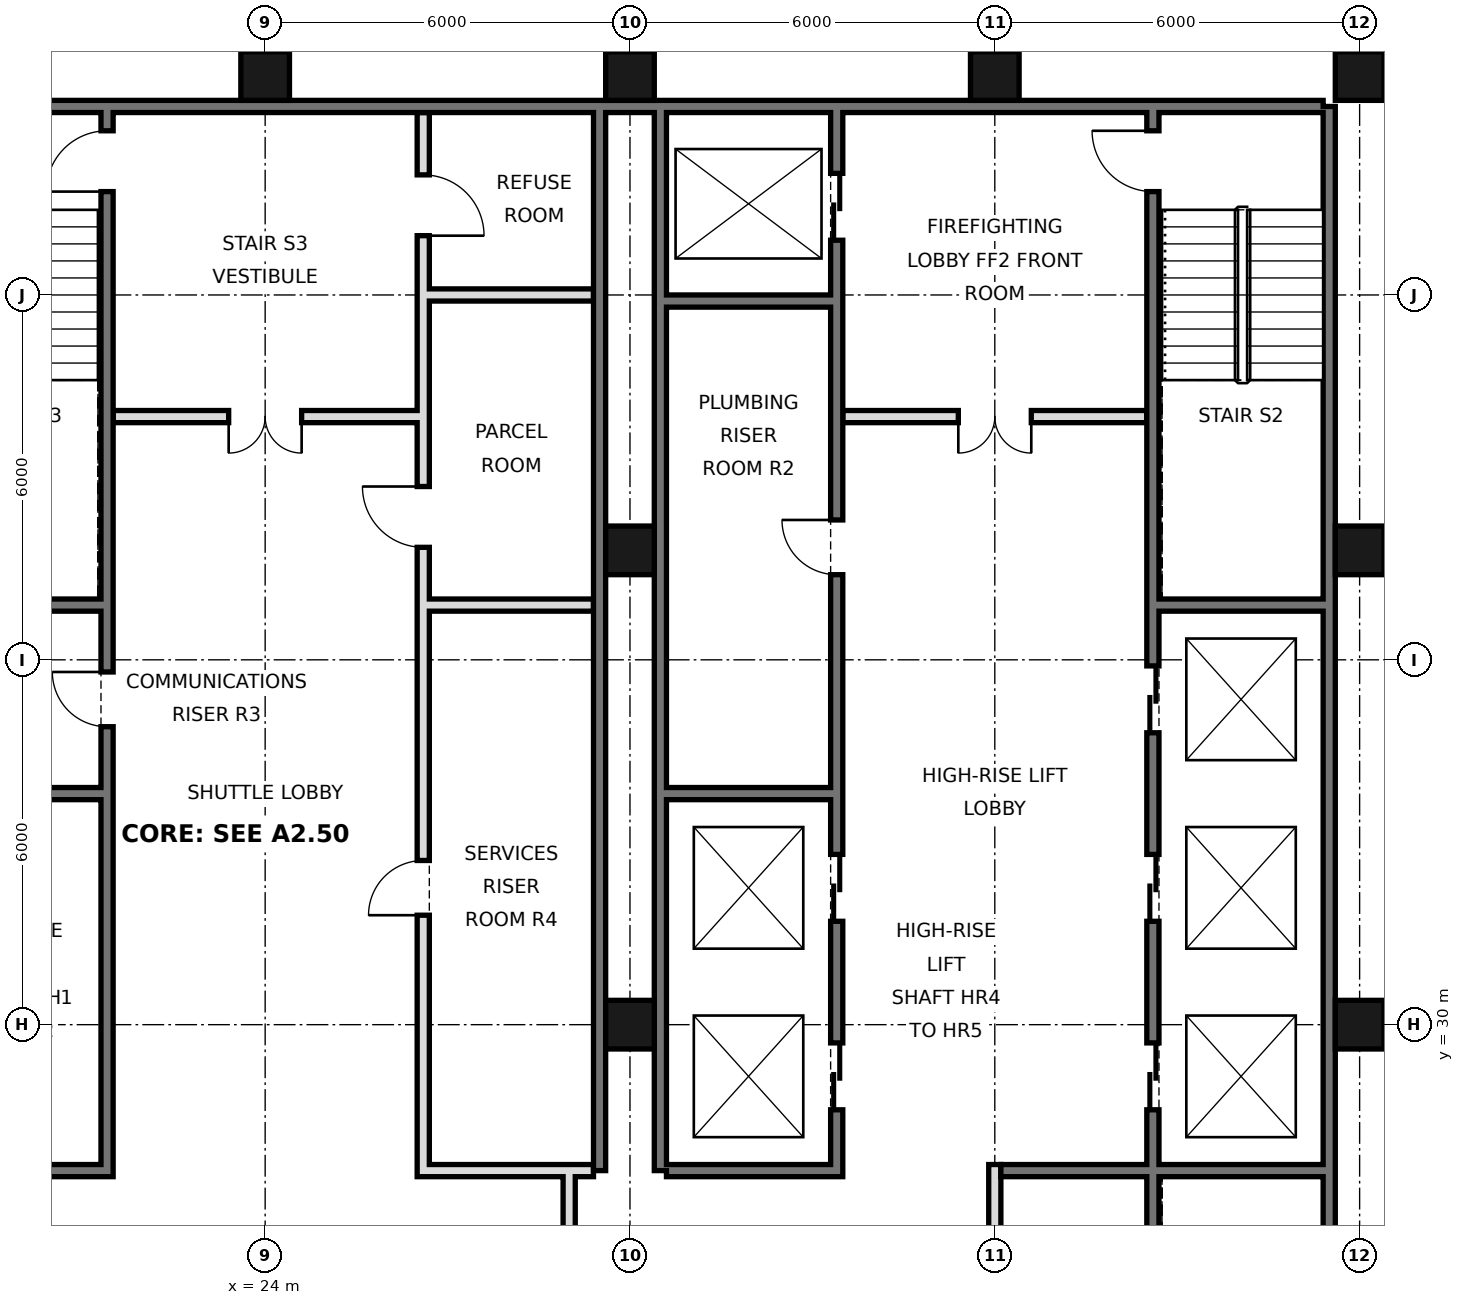
"""IFC4 building model, lengths in metres.
Left out: names, types, materials, properties, quantities, classifications, styles, units other than length and angle.
Written with IfcOpenShell. Run it as: python <this file> out.ifc"""

import sys

from ifc_helpers import new_model, si_unit, direction, frame, frame_2d, origin, origin_2d, place, context, subcontext, project, spatial, rectangle, hollow_rectangle, extrude, element, fill, save


model = new_model("IFC4")
c1 = context("Model", 3, precision=1e-05, world=origin(), true_north=direction((0.0, 1.0)))
c2 = subcontext(c1, "Body", "Model", "MODEL_VIEW")
j1 = project(units=[si_unit("LENGTHUNIT", "METRE"), si_unit("PLANEANGLEUNIT", "RADIAN")], contexts=[c1])
p1 = place(None, origin())
s1 = spatial("IfcSite", under=j1, at=p1, CompositionType="ELEMENT")
p2 = place(p1, origin())
s2 = spatial("IfcBuilding", under=s1, at=p2, CompositionType="ELEMENT")
p3 = place(p2, frame((0.0, 0.0, 199.2)))
s3 = spatial("IfcBuildingStorey", under=s2, at=p3, CompositionType="ELEMENT", Elevation=199.2)
for number, where, z_axis, x_axis in (
    (1, (24.0, 45.6, 0.0), (0.0, 0.0, 1.0), (1.0, 0.0, 0.0)),
    (2, (30.0, 30.0, 0.0), (0.0, 0.0, 1.0), (1.0, 0.0, 0.0)),
    (3, (30.0, 37.8, 0.0), (0.0, 0.0, 1.0), (1.0, 0.0, 0.0)),
    (4, (30.0, 45.6, 0.0), (0.0, 0.0, 1.0), (1.0, 0.0, 0.0)),
    (5, (36.0, 45.6, 0.0), (0.0, 0.0, 1.0), (1.0, 0.0, 0.0)),
    (6, (42.0, 30.0, 0.0), (0.0, 0.0, 1.0), (1.0, 0.0, 0.0)),
    (7, (42.0, 37.8, 0.0), (0.0, 0.0, 1.0), (1.0, 0.0, 0.0)),
    (8, (42.0, 45.6, 0.0), (0.0, 0.0, 1.0), (1.0, 0.0, 0.0)),
):
    element("IfcColumn", number, at=place(p3, frame(where, z_axis=z_axis, x_axis=x_axis)), inside=s3, PredefinedType="COLUMN", context=c2, shape_type="SweptSolid", body=[
        extrude(hollow_rectangle(XDim=0.8, YDim=0.8, WallThickness=0.04, at=origin_2d()), origin(), (0.0, 0.0, 1.0), 3.6),
    ])
p4 = place(p3, frame((41.5, 21.6, 0.0), z_axis=(0.0, 0.0, 1.0), x_axis=(0.0, 1.0, 0.0)))
e9 = element("IfcWall", 9, at=p4, inside=s3, PredefinedType="SOLIDWALL", context=c2, shape_type="SweptSolid", body=[
    extrude(rectangle(XDim=23.5, YDim=0.2, at=frame_2d((11.75, 0.0))), origin(), (0.0, 0.0, 1.0), 3.42),
])
p5 = place(p3, frame((6.6, 45.1, 0.0), z_axis=(0.0, 0.0, 1.0), x_axis=(1.0, 0.0, 0.0)))
e10 = element("IfcWall", 10, at=p5, inside=s3, PredefinedType="SOLIDWALL", context=c2, shape_type="SweptSolid", body=[
    extrude(rectangle(XDim=34.8, YDim=0.2, at=frame_2d((17.4, 0.0))), origin(), (0.0, 0.0, 1.0), 3.42),
])
for number, where, z_axis, x_axis in (
    (11, (29.5, 27.6, 0.0), (0.0, 0.0, 1.0), (0.0, 1.0, 0.0)),
    (12, (30.5, 27.6, 0.0), (0.0, 0.0, 1.0), (0.0, 1.0, 0.0)),
):
    element("IfcWall", number, at=place(p3, frame(where, z_axis=z_axis, x_axis=x_axis)), inside=s3, PredefinedType="SOLIDWALL", context=c2, shape_type="SweptSolid", body=[
        extrude(rectangle(XDim=17.5, YDim=0.2, at=frame_2d((8.75, 0.0))), origin(), (0.0, 0.0, 1.0), 3.42),
    ])
p6 = place(p3, frame((29.0, 21.6, 0.0), z_axis=(0.0, 0.0, 1.0), x_axis=(0.0, 1.0, 0.0)))
e13 = element("IfcWall", 13, at=p6, inside=s3, PredefinedType="PARTITIONING", context=c2, shape_type="SweptSolid", body=[
    extrude(rectangle(XDim=6.0, YDim=0.2, at=frame_2d((3.0, 0.0))), origin(), (0.0, 0.0, 1.0), 3.42),
])
p7 = place(p6, frame((2.1, 0.0, 0.0)))
e14 = element("IfcOpeningElement", 14, at=p7, cuts=e13, PredefinedType="OPENING", context=c2, shape_type="SweptSolid", body=[
    extrude(rectangle(XDim=1.8, YDim=2.1, at=frame_2d((0.9, 1.05))), frame((0.0, 0.11, 0.0), z_axis=(0.0, -1.0, 0.0), x_axis=(1.0, 0.0, 0.0)), (0.0, 0.0, 1.0), 0.22),
])
p8 = place(p3, frame((21.4, 27.5, 0.0), z_axis=(0.0, 0.0, 1.0), x_axis=(0.0, 1.0, 0.0)))
e15 = element("IfcWall", 15, at=p8, inside=s3, PredefinedType="SOLIDWALL", context=c2, shape_type="SweptSolid", body=[
    extrude(rectangle(XDim=17.5, YDim=0.2, at=frame_2d((8.75, 0.0))), origin(), (0.0, 0.0, 1.0), 3.42),
])
p9 = place(p8, frame((16.2, 0.0, 0.0)))
e16 = element("IfcOpeningElement", 16, at=p9, cuts=e15, PredefinedType="OPENING", context=c2, shape_type="SweptSolid", body=[
    extrude(rectangle(XDim=1.0, YDim=2.1, at=frame_2d((0.5, 1.05))), frame((0.0, 0.11, 0.0), z_axis=(0.0, -1.0, 0.0), x_axis=(1.0, 0.0, 0.0)), (0.0, 0.0, 1.0), 0.22),
])
p10 = place(p8, frame((7.4, 0.0, 0.0)))
e17 = element("IfcOpeningElement", 17, at=p10, cuts=e15, PredefinedType="OPENING", context=c2, shape_type="SweptSolid", body=[
    extrude(rectangle(XDim=0.9, YDim=2.1, at=frame_2d((0.45, 1.05))), frame((0.0, 0.11, 0.0), z_axis=(0.0, -1.0, 0.0), x_axis=(1.0, 0.0, 0.0)), (0.0, 0.0, 1.0), 0.22),
])
p11 = place(p3, frame((26.6, 27.5, 0.0), z_axis=(0.0, 0.0, 1.0), x_axis=(0.0, 1.0, 0.0)))
e18 = element("IfcWall", 18, at=p11, inside=s3, PredefinedType="SOLIDWALL", context=c2, shape_type="SweptSolid", body=[
    extrude(rectangle(XDim=17.5, YDim=0.2, at=frame_2d((8.75, 0.0))), origin(), (0.0, 0.0, 1.0), 3.42),
])
p12 = place(p11, frame((4.3, 0.0, 0.0)))
e19 = element("IfcOpeningElement", 19, at=p12, cuts=e18, PredefinedType="OPENING", context=c2, shape_type="SweptSolid", body=[
    extrude(rectangle(XDim=0.9, YDim=2.1, at=frame_2d((0.45, 1.05))), frame((0.0, 0.11, 0.0), z_axis=(0.0, -1.0, 0.0), x_axis=(1.0, 0.0, 0.0)), (0.0, 0.0, 1.0), 0.22),
])
p13 = place(p11, frame((10.35, 0.0, 0.0)))
e20 = element("IfcOpeningElement", 20, at=p13, cuts=e18, PredefinedType="OPENING", context=c2, shape_type="SweptSolid", body=[
    extrude(rectangle(XDim=1.0, YDim=2.1, at=frame_2d((0.5, 1.05))), frame((0.0, 0.11, 0.0), z_axis=(0.0, -1.0, 0.0), x_axis=(1.0, 0.0, 0.0)), (0.0, 0.0, 1.0), 0.22),
])
p14 = place(p11, frame((15.475, 0.0, 0.0)))
e21 = element("IfcOpeningElement", 21, at=p14, cuts=e18, PredefinedType="OPENING", context=c2, shape_type="SweptSolid", body=[
    extrude(rectangle(XDim=1.0, YDim=2.1, at=frame_2d((0.5, 1.05))), frame((0.0, 0.11, 0.0), z_axis=(0.0, -1.0, 0.0), x_axis=(1.0, 0.0, 0.0)), (0.0, 0.0, 1.0), 0.22),
])
p15 = place(p3, frame((33.4, 27.5, 0.0), z_axis=(0.0, 0.0, 1.0), x_axis=(0.0, 1.0, 0.0)))
e22 = element("IfcWall", 22, at=p15, inside=s3, PredefinedType="SOLIDWALL", context=c2, shape_type="SweptSolid", body=[
    extrude(rectangle(XDim=17.5, YDim=0.2, at=frame_2d((8.75, 0.0))), origin(), (0.0, 0.0, 1.0), 3.42),
])
p16 = place(p15, frame((1.1, 0.0, 0.0)))
e23 = element("IfcOpeningElement", 23, at=p16, cuts=e22, PredefinedType="OPENING", context=c2, shape_type="SweptSolid", body=[
    extrude(rectangle(XDim=1.1, YDim=2.1, at=frame_2d((0.55, 1.05))), frame((0.0, 0.11, 0.0), z_axis=(0.0, -1.0, 0.0), x_axis=(1.0, 0.0, 0.0)), (0.0, 0.0, 1.0), 0.22),
])
p17 = place(p15, frame((4.2, 0.0, 0.0)))
e24 = element("IfcOpeningElement", 24, at=p17, cuts=e22, PredefinedType="OPENING", context=c2, shape_type="SweptSolid", body=[
    extrude(rectangle(XDim=1.1, YDim=2.1, at=frame_2d((0.55, 1.05))), frame((0.0, 0.11, 0.0), z_axis=(0.0, -1.0, 0.0), x_axis=(1.0, 0.0, 0.0)), (0.0, 0.0, 1.0), 0.22),
])
p18 = place(p15, frame((15.4, 0.0, 0.0)))
e25 = element("IfcOpeningElement", 25, at=p18, cuts=e22, PredefinedType="OPENING", context=c2, shape_type="SweptSolid", body=[
    extrude(rectangle(XDim=1.1, YDim=2.1, at=frame_2d((0.55, 1.05))), frame((0.0, 0.11, 0.0), z_axis=(0.0, -1.0, 0.0), x_axis=(1.0, 0.0, 0.0)), (0.0, 0.0, 1.0), 0.22),
])
p19 = place(p15, frame((9.9, 0.0, 0.0)))
e26 = element("IfcOpeningElement", 26, at=p19, cuts=e22, PredefinedType="OPENING", context=c2, shape_type="SweptSolid", body=[
    extrude(rectangle(XDim=0.9, YDim=2.1, at=frame_2d((0.45, 1.05))), frame((0.0, 0.11, 0.0), z_axis=(0.0, -1.0, 0.0), x_axis=(1.0, 0.0, 0.0)), (0.0, 0.0, 1.0), 0.22),
])
p20 = place(p3, frame((36.0, 21.6, 0.0), z_axis=(0.0, 0.0, 1.0), x_axis=(0.0, 1.0, 0.0)))
e27 = element("IfcWall", 27, at=p20, inside=s3, PredefinedType="PARTITIONING", context=c2, shape_type="SweptSolid", body=[
    extrude(rectangle(XDim=6.1, YDim=0.2, at=frame_2d((3.05, 0.0))), origin(), (0.0, 0.0, 1.0), 3.42),
])
p21 = place(p3, frame((38.6, 21.6, 0.0), z_axis=(0.0, 0.0, 1.0), x_axis=(0.0, 1.0, 0.0)))
e28 = element("IfcWall", 28, at=p21, inside=s3, PredefinedType="SOLIDWALL", context=c2, shape_type="SweptSolid", body=[
    extrude(rectangle(XDim=23.4, YDim=0.2, at=frame_2d((11.7, 0.0))), origin(), (0.0, 0.0, 1.0), 3.42),
])
p22 = place(p21, frame((7.0, 0.0, 0.0)))
e29 = element("IfcOpeningElement", 29, at=p22, cuts=e28, PredefinedType="OPENING", context=c2, shape_type="SweptSolid", body=[
    extrude(rectangle(XDim=1.1, YDim=2.1, at=frame_2d((0.55, 1.05))), frame((0.0, 0.11, 0.0), z_axis=(0.0, -1.0, 0.0), x_axis=(1.0, 0.0, 0.0)), (0.0, 0.0, 1.0), 0.22),
])
p23 = place(p21, frame((10.1, 0.0, 0.0)))
e30 = element("IfcOpeningElement", 30, at=p23, cuts=e28, PredefinedType="OPENING", context=c2, shape_type="SweptSolid", body=[
    extrude(rectangle(XDim=1.1, YDim=2.1, at=frame_2d((0.55, 1.05))), frame((0.0, 0.11, 0.0), z_axis=(0.0, -1.0, 0.0), x_axis=(1.0, 0.0, 0.0)), (0.0, 0.0, 1.0), 0.22),
])
p24 = place(p21, frame((13.2, 0.0, 0.0)))
e31 = element("IfcOpeningElement", 31, at=p24, cuts=e28, PredefinedType="OPENING", context=c2, shape_type="SweptSolid", body=[
    extrude(rectangle(XDim=1.1, YDim=2.1, at=frame_2d((0.55, 1.05))), frame((0.0, 0.11, 0.0), z_axis=(0.0, -1.0, 0.0), x_axis=(1.0, 0.0, 0.0)), (0.0, 0.0, 1.0), 0.22),
])
p25 = place(p21, frame((22.1, 0.0, 0.0)))
e32 = element("IfcOpeningElement", 32, at=p25, cuts=e28, PredefinedType="OPENING", context=c2, shape_type="SweptSolid", body=[
    extrude(rectangle(XDim=1.0, YDim=2.1, at=frame_2d((0.5, 1.05))), frame((0.0, 0.11, 0.0), z_axis=(0.0, -1.0, 0.0), x_axis=(1.0, 0.0, 0.0)), (0.0, 0.0, 1.0), 0.22),
])
p26 = place(p21, frame((0.175, 0.0, 0.0)))
e33 = element("IfcOpeningElement", 33, at=p26, cuts=e28, PredefinedType="OPENING", context=c2, shape_type="SweptSolid", body=[
    extrude(rectangle(XDim=0.9, YDim=2.1, at=frame_2d((0.45, 1.05))), frame((0.0, 0.11, 0.0), z_axis=(0.0, -1.0, 0.0), x_axis=(1.0, 0.0, 0.0)), (0.0, 0.0, 1.0), 0.22),
])
for number, where, z_axis, x_axis in (
    (34, (18.6, 27.6, 0.0), (0.0, 0.0, 1.0), (1.0, 0.0, 0.0)),
    (35, (26.7, 27.6, 0.0), (0.0, 0.0, 1.0), (1.0, 0.0, 0.0)),
    (36, (30.6, 27.6, 0.0), (0.0, 0.0, 1.0), (1.0, 0.0, 0.0)),
):
    element("IfcWall", number, at=place(p3, frame(where, z_axis=z_axis, x_axis=x_axis)), inside=s3, PredefinedType="SOLIDWALL", context=c2, shape_type="SweptSolid", body=[
        extrude(rectangle(XDim=2.7, YDim=0.2, at=frame_2d((1.35, 0.0))), origin(), (0.0, 0.0, 1.0), 3.42),
    ])
p27 = place(p3, frame((36.1, 27.6, 0.0), z_axis=(0.0, 0.0, 1.0), x_axis=(1.0, 0.0, 0.0)))
e37 = element("IfcWall", 37, at=p27, inside=s3, PredefinedType="SOLIDWALL", context=c2, shape_type="SweptSolid", body=[
    extrude(rectangle(XDim=5.3, YDim=0.2, at=frame_2d((2.65, 0.0))), origin(), (0.0, 0.0, 1.0), 3.42),
])
for number, where, z_axis, x_axis in (
    (38, (18.6, 33.8, 0.0), (0.0, 0.0, 1.0), (1.0, 0.0, 0.0)),
    (39, (30.6, 33.8, 0.0), (0.0, 0.0, 1.0), (1.0, 0.0, 0.0)),
    (40, (18.6, 36.9, 0.0), (0.0, 0.0, 1.0), (1.0, 0.0, 0.0)),
    (41, (26.7, 36.9, 0.0), (0.0, 0.0, 1.0), (1.0, 0.0, 0.0)),
    (42, (38.7, 36.9, 0.0), (0.0, 0.0, 1.0), (1.0, 0.0, 0.0)),
):
    element("IfcWall", number, at=place(p3, frame(where, z_axis=z_axis, x_axis=x_axis)), inside=s3, PredefinedType="SOLIDWALL", context=c2, shape_type="SweptSolid", body=[
        extrude(rectangle(XDim=2.7, YDim=0.2, at=frame_2d((1.35, 0.0))), origin(), (0.0, 0.0, 1.0), 3.42),
    ])
p28 = place(p3, frame((21.5, 40.0, 0.0), z_axis=(0.0, 0.0, 1.0), x_axis=(1.0, 0.0, 0.0)))
e43 = element("IfcWall", 43, at=p28, inside=s3, PredefinedType="PARTITIONING", context=c2, shape_type="SweptSolid", body=[
    extrude(rectangle(XDim=5.0, YDim=0.2, at=frame_2d((2.5, 0.0))), origin(), (0.0, 0.0, 1.0), 3.42),
])
p29 = place(p28, frame((1.9, 0.0, 0.0)))
e44 = element("IfcOpeningElement", 44, at=p29, cuts=e43, PredefinedType="OPENING", context=c2, shape_type="SweptSolid", body=[
    extrude(rectangle(XDim=1.2, YDim=2.1, at=frame_2d((0.6, 1.05))), frame((0.0, 0.11, 0.0), z_axis=(0.0, -1.0, 0.0), x_axis=(1.0, 0.0, 0.0)), (0.0, 0.0, 1.0), 0.22),
])
p30 = place(p3, frame((33.5, 40.0, 0.0), z_axis=(0.0, 0.0, 1.0), x_axis=(1.0, 0.0, 0.0)))
e45 = element("IfcWall", 45, at=p30, inside=s3, PredefinedType="PARTITIONING", context=c2, shape_type="SweptSolid", body=[
    extrude(rectangle(XDim=5.0, YDim=0.2, at=frame_2d((2.5, 0.0))), origin(), (0.0, 0.0, 1.0), 3.42),
])
p31 = place(p30, frame((1.9, 0.0, 0.0)))
e46 = element("IfcOpeningElement", 46, at=p31, cuts=e45, PredefinedType="OPENING", context=c2, shape_type="SweptSolid", body=[
    extrude(rectangle(XDim=1.2, YDim=2.1, at=frame_2d((0.6, 1.05))), frame((0.0, 0.11, 0.0), z_axis=(0.0, -1.0, 0.0), x_axis=(1.0, 0.0, 0.0)), (0.0, 0.0, 1.0), 0.22),
])
p32 = place(p3, frame((30.6, 41.9, 0.0), z_axis=(0.0, 0.0, 1.0), x_axis=(1.0, 0.0, 0.0)))
e47 = element("IfcWall", 47, at=p32, inside=s3, PredefinedType="SOLIDWALL", context=c2, shape_type="SweptSolid", body=[
    extrude(rectangle(XDim=2.7, YDim=0.2, at=frame_2d((1.35, 0.0))), origin(), (0.0, 0.0, 1.0), 3.42),
])
p33 = place(p3, frame((26.7, 42.0, 0.0), z_axis=(0.0, 0.0, 1.0), x_axis=(1.0, 0.0, 0.0)))
e48 = element("IfcWall", 48, at=p33, inside=s3, PredefinedType="PARTITIONING", context=c2, shape_type="SweptSolid", body=[
    extrude(rectangle(XDim=2.7, YDim=0.2, at=frame_2d((1.35, 0.0))), origin(), (0.0, 0.0, 1.0), 3.42),
])
p34 = place(p29, frame((1.2, 0.0, 0.0), z_axis=(0.0, 0.0, 1.0), x_axis=(-1.0, 0.0, 0.0)))
e49 = element("IfcDoor", 49, at=p34, inside=s3, OperationType="DOUBLE_DOOR_SINGLE_SWING", PredefinedType="DOOR", context=c2, shape_type="SweptSolid", body=[
    extrude(rectangle(XDim=1.2, YDim=2.1, at=frame_2d((0.6, 1.05))), frame((0.0, 0.025, 0.0), z_axis=(0.0, -1.0, 0.0), x_axis=(1.0, 0.0, 0.0)), (0.0, 0.0, 1.0), 0.05),
])
fill(e44, e49)
p35 = place(p31, frame((1.2, 0.0, 0.0), z_axis=(0.0, 0.0, 1.0), x_axis=(-1.0, 0.0, 0.0)))
e50 = element("IfcDoor", 50, at=p35, inside=s3, OperationType="DOUBLE_DOOR_SINGLE_SWING", PredefinedType="DOOR", context=c2, shape_type="SweptSolid", body=[
    extrude(rectangle(XDim=1.2, YDim=2.1, at=frame_2d((0.6, 1.05))), frame((0.0, 0.025, 0.0), z_axis=(0.0, -1.0, 0.0), x_axis=(1.0, 0.0, 0.0)), (0.0, 0.0, 1.0), 0.05),
])
fill(e46, e50)
p36 = place(p22, origin())
e51 = element("IfcDoor", 51, at=p36, inside=s3, OperationType="DOUBLE_DOOR_SLIDING", PredefinedType="DOOR", context=c2, shape_type="SweptSolid", body=[
    extrude(rectangle(XDim=1.1, YDim=2.1, at=frame_2d((0.55, 1.05))), frame((0.0, 0.025, 0.0), z_axis=(0.0, -1.0, 0.0), x_axis=(1.0, 0.0, 0.0)), (0.0, 0.0, 1.0), 0.05),
])
fill(e29, e51)
p37 = place(p23, origin())
e52 = element("IfcDoor", 52, at=p37, inside=s3, OperationType="DOUBLE_DOOR_SLIDING", PredefinedType="DOOR", context=c2, shape_type="SweptSolid", body=[
    extrude(rectangle(XDim=1.1, YDim=2.1, at=frame_2d((0.55, 1.05))), frame((0.0, 0.025, 0.0), z_axis=(0.0, -1.0, 0.0), x_axis=(1.0, 0.0, 0.0)), (0.0, 0.0, 1.0), 0.05),
])
fill(e30, e52)
p38 = place(p24, origin())
e53 = element("IfcDoor", 53, at=p38, inside=s3, OperationType="DOUBLE_DOOR_SLIDING", PredefinedType="DOOR", context=c2, shape_type="SweptSolid", body=[
    extrude(rectangle(XDim=1.1, YDim=2.1, at=frame_2d((0.55, 1.05))), frame((0.0, 0.025, 0.0), z_axis=(0.0, -1.0, 0.0), x_axis=(1.0, 0.0, 0.0)), (0.0, 0.0, 1.0), 0.05),
])
fill(e31, e53)
p39 = place(p16, origin())
e54 = element("IfcDoor", 54, at=p39, inside=s3, OperationType="DOUBLE_DOOR_SLIDING", PredefinedType="DOOR", context=c2, shape_type="SweptSolid", body=[
    extrude(rectangle(XDim=1.1, YDim=2.1, at=frame_2d((0.55, 1.05))), frame((0.0, 0.025, 0.0), z_axis=(0.0, -1.0, 0.0), x_axis=(1.0, 0.0, 0.0)), (0.0, 0.0, 1.0), 0.05),
])
fill(e23, e54)
p40 = place(p17, origin())
e55 = element("IfcDoor", 55, at=p40, inside=s3, OperationType="DOUBLE_DOOR_SLIDING", PredefinedType="DOOR", context=c2, shape_type="SweptSolid", body=[
    extrude(rectangle(XDim=1.1, YDim=2.1, at=frame_2d((0.55, 1.05))), frame((0.0, 0.025, 0.0), z_axis=(0.0, -1.0, 0.0), x_axis=(1.0, 0.0, 0.0)), (0.0, 0.0, 1.0), 0.05),
])
fill(e24, e55)
p41 = place(p18, origin())
e56 = element("IfcDoor", 56, at=p41, inside=s3, OperationType="DOUBLE_DOOR_SLIDING", PredefinedType="DOOR", context=c2, shape_type="SweptSolid", body=[
    extrude(rectangle(XDim=1.1, YDim=2.1, at=frame_2d((0.55, 1.05))), frame((0.0, 0.025, 0.0), z_axis=(0.0, -1.0, 0.0), x_axis=(1.0, 0.0, 0.0)), (0.0, 0.0, 1.0), 0.05),
])
fill(e25, e56)
p42 = place(p25, frame((1.0, 0.0, 0.0), z_axis=(0.0, 0.0, 1.0), x_axis=(-1.0, 0.0, 0.0)))
e57 = element("IfcDoor", 57, at=p42, inside=s3, OperationType="SINGLE_SWING_LEFT", PredefinedType="DOOR", context=c2, shape_type="SweptSolid", body=[
    extrude(rectangle(XDim=1.0, YDim=2.1, at=frame_2d((0.5, 1.05))), frame((0.0, 0.025, 0.0), z_axis=(0.0, -1.0, 0.0), x_axis=(1.0, 0.0, 0.0)), (0.0, 0.0, 1.0), 0.05),
])
fill(e32, e57)
p43 = place(p9, origin())
e58 = element("IfcDoor", 58, at=p43, inside=s3, OperationType="SINGLE_SWING_LEFT", PredefinedType="DOOR", context=c2, shape_type="SweptSolid", body=[
    extrude(rectangle(XDim=1.0, YDim=2.1, at=frame_2d((0.5, 1.05))), frame((0.0, 0.025, 0.0), z_axis=(0.0, -1.0, 0.0), x_axis=(1.0, 0.0, 0.0)), (0.0, 0.0, 1.0), 0.05),
])
fill(e16, e58)
p44 = place(p19, frame((0.9, 0.0, 0.0), z_axis=(0.0, 0.0, 1.0), x_axis=(-1.0, 0.0, 0.0)))
e59 = element("IfcDoor", 59, at=p44, inside=s3, OperationType="SINGLE_SWING_LEFT", PredefinedType="DOOR", context=c2, shape_type="SweptSolid", body=[
    extrude(rectangle(XDim=0.9, YDim=2.1, at=frame_2d((0.45, 1.05))), frame((0.0, 0.025, 0.0), z_axis=(0.0, -1.0, 0.0), x_axis=(1.0, 0.0, 0.0)), (0.0, 0.0, 1.0), 0.05),
])
fill(e26, e59)
p45 = place(p10, frame((0.9, 0.0, 0.0), z_axis=(0.0, 0.0, 1.0), x_axis=(-1.0, 0.0, 0.0)))
e60 = element("IfcDoor", 60, at=p45, inside=s3, OperationType="SINGLE_SWING_LEFT", PredefinedType="DOOR", context=c2, shape_type="SweptSolid", body=[
    extrude(rectangle(XDim=0.9, YDim=2.1, at=frame_2d((0.45, 1.05))), frame((0.0, 0.025, 0.0), z_axis=(0.0, -1.0, 0.0), x_axis=(1.0, 0.0, 0.0)), (0.0, 0.0, 1.0), 0.05),
])
fill(e17, e60)
p46 = place(p12, origin())
e61 = element("IfcDoor", 61, at=p46, inside=s3, OperationType="SINGLE_SWING_LEFT", PredefinedType="DOOR", context=c2, shape_type="SweptSolid", body=[
    extrude(rectangle(XDim=0.9, YDim=2.1, at=frame_2d((0.45, 1.05))), frame((0.0, 0.025, 0.0), z_axis=(0.0, -1.0, 0.0), x_axis=(1.0, 0.0, 0.0)), (0.0, 0.0, 1.0), 0.05),
])
fill(e19, e61)
p47 = place(p13, frame((1.0, 0.0, 0.0), z_axis=(0.0, 0.0, 1.0), x_axis=(-1.0, 0.0, 0.0)))
e62 = element("IfcDoor", 62, at=p47, inside=s3, OperationType="SINGLE_SWING_LEFT", PredefinedType="DOOR", context=c2, shape_type="SweptSolid", body=[
    extrude(rectangle(XDim=1.0, YDim=2.1, at=frame_2d((0.5, 1.05))), frame((0.0, 0.025, 0.0), z_axis=(0.0, -1.0, 0.0), x_axis=(1.0, 0.0, 0.0)), (0.0, 0.0, 1.0), 0.05),
])
fill(e20, e62)
p48 = place(p14, frame((1.0, 0.0, 0.0), z_axis=(0.0, 0.0, 1.0), x_axis=(-1.0, 0.0, 0.0)))
e63 = element("IfcDoor", 63, at=p48, inside=s3, OperationType="SINGLE_SWING_RIGHT", PredefinedType="DOOR", context=c2, shape_type="SweptSolid", body=[
    extrude(rectangle(XDim=1.0, YDim=2.1, at=frame_2d((0.5, 1.05))), frame((0.0, 0.025, 0.0), z_axis=(0.0, -1.0, 0.0), x_axis=(1.0, 0.0, 0.0)), (0.0, 0.0, 1.0), 0.05),
])
fill(e21, e63)
save(model, sys.argv[1])
